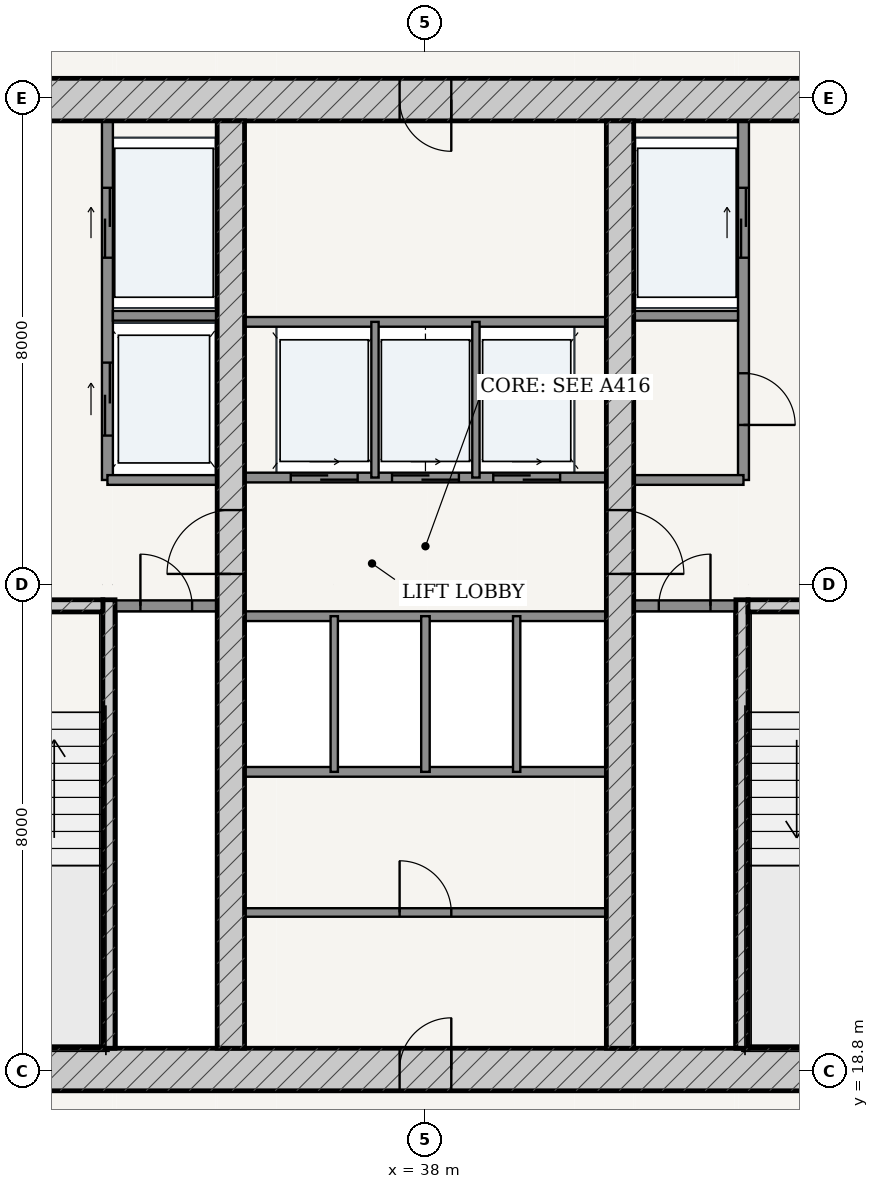
"""IFC4 building model, lengths in metres.
Left out: names, types, materials, properties, quantities, classifications, styles, units other than length and angle.
Written with IfcOpenShell. Run it as: python <this file> out.ifc"""

import sys

from ifc_helpers import new_model, si_unit, direction, frame, frame_2d, origin, place, context, subcontext, project, spatial, rectangle, extrude, source, transform, mapped, element, fill, save


model = new_model("IFC4")
c1 = context("Model", 3, precision=1e-05, world=origin(), true_north=direction((-0.2419218956, 0.970295726276)))
c2 = subcontext(c1, "Body", "Model", "MODEL_VIEW")
j1 = project(units=[si_unit("LENGTHUNIT", "METRE"), si_unit("PLANEANGLEUNIT", "RADIAN")], contexts=[c1])
p1 = place(None, origin())
s1 = spatial("IfcSite", under=j1, at=p1, CompositionType="ELEMENT")
p2 = place(p1, origin())
s2 = spatial("IfcBuilding", under=s1, at=p2, CompositionType="ELEMENT")
p3 = place(p2, frame((0.0, 0.0, 94.2)))
s3 = spatial("IfcBuildingStorey", under=s2, at=p3, CompositionType="ELEMENT", Elevation=94.2)
p4 = place(p3, frame((28.675, 18.825, 0.0), z_axis=(0.0, 0.0, 1.0), x_axis=(1.0, 0.0, 0.0)))
e1 = element("IfcWall", 1, at=p4, inside=s3, PredefinedType="SHEAR", context=c2, shape_type="SweptSolid", body=[
    extrude(rectangle(XDim=18.65, YDim=0.7, at=frame_2d((9.325, 0.0))), origin(), (0.0, 0.0, 1.0), 3.325),
])
p5 = place(p4, frame((8.9, 0.0, 0.0)))
e2 = element("IfcOpeningElement", 2, at=p5, cuts=e1, PredefinedType="OPENING", context=c2, shape_type="SweptSolid", body=[
    extrude(rectangle(XDim=0.85, YDim=2.1, at=frame_2d((0.425, 1.05))), frame((0.0, 0.36, 0.0), z_axis=(0.0, -1.0, 0.0), x_axis=(1.0, 0.0, 0.0)), (0.0, 0.0, 1.0), 0.72),
])
p6 = place(p3, frame((28.675, 34.775, 0.0), z_axis=(0.0, 0.0, 1.0), x_axis=(1.0, 0.0, 0.0)))
e3 = element("IfcWall", 3, at=p6, inside=s3, PredefinedType="SHEAR", context=c2, shape_type="SweptSolid", body=[
    extrude(rectangle(XDim=18.65, YDim=0.7, at=frame_2d((9.325, 0.0))), origin(), (0.0, 0.0, 1.0), 3.325),
])
p7 = place(p6, frame((8.9, 0.0, 0.0)))
e4 = element("IfcOpeningElement", 4, at=p7, cuts=e3, PredefinedType="OPENING", context=c2, shape_type="SweptSolid", body=[
    extrude(rectangle(XDim=0.85, YDim=2.1, at=frame_2d((0.425, 1.05))), frame((0.0, 0.36, 0.0), z_axis=(0.0, -1.0, 0.0), x_axis=(1.0, 0.0, 0.0)), (0.0, 0.0, 1.0), 0.72),
])
p8 = place(p3, frame((32.795, 19.175, 0.0), z_axis=(0.0, 0.0, 1.0), x_axis=(0.0, 1.0, 0.0)))
e5 = element("IfcWall", 5, at=p8, inside=s3, PredefinedType="SOLIDWALL", context=c2, shape_type="SweptSolid", body=[
    extrude(rectangle(XDim=7.375, YDim=0.2, at=frame_2d((3.688, 0.0))), origin(), (0.0, 0.0, 1.0), 3.325),
])
p9 = place(p3, frame((29.375, 26.45, 0.0), z_axis=(0.0, 0.0, 1.0), x_axis=(1.0, 0.0, 0.0)))
e6 = element("IfcWall", 6, at=p9, inside=s3, PredefinedType="SOLIDWALL", context=c2, shape_type="SweptSolid", body=[
    extrude(rectangle(XDim=3.32, YDim=0.2, at=frame_2d((1.66, 0.0))), origin(), (0.0, 0.0, 1.0), 3.325),
])
p10 = place(p9, frame((1.185, 0.0, 0.0)))
e7 = element("IfcOpeningElement", 7, at=p10, cuts=e6, PredefinedType="OPENING", context=c2, shape_type="SweptSolid", body=[
    extrude(rectangle(XDim=0.95, YDim=2.15, at=frame_2d((0.475, 1.075))), frame((0.0, 0.11, 0.0), z_axis=(0.0, -1.0, 0.0), x_axis=(1.0, 0.0, 0.0)), (0.0, 0.0, 1.0), 0.22),
])
p11 = place(p3, frame((43.205, 19.175, 0.0), z_axis=(0.0, 0.0, 1.0), x_axis=(0.0, 1.0, 0.0)))
e8 = element("IfcWall", 8, at=p11, inside=s3, PredefinedType="SOLIDWALL", context=c2, shape_type="SweptSolid", body=[
    extrude(rectangle(XDim=7.375, YDim=0.2, at=frame_2d((3.688, 0.0))), origin(), (0.0, 0.0, 1.0), 3.325),
])
p12 = place(p3, frame((43.305, 26.45, 0.0), z_axis=(0.0, 0.0, 1.0), x_axis=(1.0, 0.0, 0.0)))
e9 = element("IfcWall", 9, at=p12, inside=s3, PredefinedType="SOLIDWALL", context=c2, shape_type="SweptSolid", body=[
    extrude(rectangle(XDim=3.32, YDim=0.2, at=frame_2d((1.66, 0.0))), origin(), (0.0, 0.0, 1.0), 3.325),
])
p13 = place(p12, frame((1.185, 0.0, 0.0)))
e10 = element("IfcOpeningElement", 10, at=p13, cuts=e9, PredefinedType="OPENING", context=c2, shape_type="SweptSolid", body=[
    extrude(rectangle(XDim=0.95, YDim=2.15, at=frame_2d((0.475, 1.075))), frame((0.0, 0.11, 0.0), z_axis=(0.0, -1.0, 0.0), x_axis=(1.0, 0.0, 0.0)), (0.0, 0.0, 1.0), 0.22),
])
p14 = place(p3, frame((34.8, 19.175, 0.0), z_axis=(0.0, 0.0, 1.0), x_axis=(0.0, 1.0, 0.0)))
e11 = element("IfcWall", 11, at=p14, inside=s3, PredefinedType="SHEAR", context=c2, shape_type="SweptSolid", body=[
    extrude(rectangle(XDim=15.25, YDim=0.45, at=frame_2d((7.625, 0.0))), origin(), (0.0, 0.0, 1.0), 3.325),
])
p15 = place(p14, frame((7.8, 0.0, 0.0)))
e12 = element("IfcOpeningElement", 12, at=p15, cuts=e11, PredefinedType="OPENING", context=c2, shape_type="SweptSolid", body=[
    extrude(rectangle(XDim=1.05, YDim=2.15, at=frame_2d((0.525, 1.075))), frame((0.0, 0.235, 0.0), z_axis=(0.0, -1.0, 0.0), x_axis=(1.0, 0.0, 0.0)), (0.0, 0.0, 1.0), 0.47),
])
p16 = place(p3, frame((41.2, 19.175, 0.0), z_axis=(0.0, 0.0, 1.0), x_axis=(0.0, 1.0, 0.0)))
e13 = element("IfcWall", 13, at=p16, inside=s3, PredefinedType="SHEAR", context=c2, shape_type="SweptSolid", body=[
    extrude(rectangle(XDim=15.25, YDim=0.45, at=frame_2d((7.625, 0.0))), origin(), (0.0, 0.0, 1.0), 3.325),
])
p17 = place(p16, frame((7.8, 0.0, 0.0)))
e14 = element("IfcOpeningElement", 14, at=p17, cuts=e13, PredefinedType="OPENING", context=c2, shape_type="SweptSolid", body=[
    extrude(rectangle(XDim=1.05, YDim=2.15, at=frame_2d((0.525, 1.075))), frame((0.0, 0.235, 0.0), z_axis=(0.0, -1.0, 0.0), x_axis=(1.0, 0.0, 0.0)), (0.0, 0.0, 1.0), 0.47),
])
p18 = place(p3, frame((32.9, 26.45, 0.0), z_axis=(0.0, 0.0, 1.0), x_axis=(1.0, 0.0, 0.0)))
e15 = element("IfcWall", 15, at=p18, inside=s3, PredefinedType="PARTITIONING", context=c2, shape_type="SweptSolid", body=[
    extrude(rectangle(XDim=1.675, YDim=0.18, at=frame_2d((0.837, 0.0))), origin(), (0.0, 0.0, 1.0), 3.325),
])
p19 = place(p18, frame((0.413, 0.0, 0.0)))
e16 = element("IfcOpeningElement", 16, at=p19, cuts=e15, PredefinedType="OPENING", context=c2, shape_type="SweptSolid", body=[
    extrude(rectangle(XDim=0.85, YDim=2.1, at=frame_2d((0.425, 1.05))), frame((0.0, 0.1, 0.0), z_axis=(0.0, -1.0, 0.0), x_axis=(1.0, 0.0, 0.0)), (0.0, 0.0, 1.0), 0.2),
])
p20 = place(p3, frame((41.425, 26.45, 0.0), z_axis=(0.0, 0.0, 1.0), x_axis=(1.0, 0.0, 0.0)))
e17 = element("IfcWall", 17, at=p20, inside=s3, PredefinedType="PARTITIONING", context=c2, shape_type="SweptSolid", body=[
    extrude(rectangle(XDim=1.675, YDim=0.18, at=frame_2d((0.837, 0.0))), origin(), (0.0, 0.0, 1.0), 3.325),
])
p21 = place(p20, frame((0.413, 0.0, 0.0)))
e18 = element("IfcOpeningElement", 18, at=p21, cuts=e17, PredefinedType="OPENING", context=c2, shape_type="SweptSolid", body=[
    extrude(rectangle(XDim=0.85, YDim=2.1, at=frame_2d((0.425, 1.05))), frame((0.0, 0.1, 0.0), z_axis=(0.0, -1.0, 0.0), x_axis=(1.0, 0.0, 0.0)), (0.0, 0.0, 1.0), 0.2),
])
p22 = place(p3, frame((32.77, 28.52, 0.0), z_axis=(0.0, 0.0, 1.0), x_axis=(0.0, 1.0, 0.0)))
e19 = element("IfcWall", 19, at=p22, inside=s3, PredefinedType="PARTITIONING", context=c2, shape_type="SweptSolid", body=[
    extrude(rectangle(XDim=5.905, YDim=0.18, at=frame_2d((2.953, 0.0))), origin(), (0.0, 0.0, 1.0), 3.325),
])
p23 = place(p22, frame((3.655, 0.0, 0.0)))
e20 = element("IfcOpeningElement", 20, at=p23, cuts=e19, PredefinedType="OPENING", context=c2, shape_type="SweptSolid", body=[
    extrude(rectangle(XDim=1.15, YDim=2.2, at=frame_2d((0.575, 1.1))), frame((0.0, 0.1, 0.0), z_axis=(0.0, -1.0, 0.0), x_axis=(1.0, 0.0, 0.0)), (0.0, 0.0, 1.0), 0.2),
])
p24 = place(p22, frame((0.73, 0.0, 0.0)))
e21 = element("IfcOpeningElement", 21, at=p24, cuts=e19, PredefinedType="OPENING", context=c2, shape_type="SweptSolid", body=[
    extrude(rectangle(XDim=1.2, YDim=2.25, at=frame_2d((0.6, 1.125))), frame((0.0, 0.1, 0.0), z_axis=(0.0, -1.0, 0.0), x_axis=(1.0, 0.0, 0.0)), (0.0, 0.0, 1.0), 0.2),
])
p25 = place(p3, frame((32.86, 31.22, 0.0), z_axis=(0.0, 0.0, 1.0), x_axis=(1.0, 0.0, 0.0)))
e22 = element("IfcWall", 22, at=p25, inside=s3, PredefinedType="PARTITIONING", context=c2, shape_type="SweptSolid", body=[
    extrude(rectangle(XDim=1.715, YDim=0.16, at=frame_2d((0.857, 0.0))), origin(), (0.0, 0.0, 1.0), 3.325),
])
p26 = place(p3, frame((32.77, 28.52, 0.0), z_axis=(0.0, 0.0, 1.0), x_axis=(1.0, 0.0, 0.0)))
e23 = element("IfcWall", 23, at=p26, inside=s3, PredefinedType="PARTITIONING", context=c2, shape_type="SweptSolid", body=[
    extrude(rectangle(XDim=1.805, YDim=0.16, at=frame_2d((0.902, 0.0))), origin(), (0.0, 0.0, 1.0), 3.325),
])
p27 = place(p3, frame((43.23, 28.52, 0.0), z_axis=(0.0, 0.0, 1.0), x_axis=(0.0, 1.0, 0.0)))
e24 = element("IfcWall", 24, at=p27, inside=s3, PredefinedType="PARTITIONING", context=c2, shape_type="SweptSolid", body=[
    extrude(rectangle(XDim=5.905, YDim=0.18, at=frame_2d((2.953, 0.0))), origin(), (0.0, 0.0, 1.0), 3.325),
])
p28 = place(p27, frame((0.905, 0.0, 0.0)))
e25 = element("IfcOpeningElement", 25, at=p28, cuts=e24, PredefinedType="OPENING", context=c2, shape_type="SweptSolid", body=[
    extrude(rectangle(XDim=0.85, YDim=2.1, at=frame_2d((0.425, 1.05))), frame((0.0, 0.1, 0.0), z_axis=(0.0, -1.0, 0.0), x_axis=(1.0, 0.0, 0.0)), (0.0, 0.0, 1.0), 0.2),
])
p29 = place(p27, frame((3.655, 0.0, 0.0)))
e26 = element("IfcOpeningElement", 26, at=p29, cuts=e24, PredefinedType="OPENING", context=c2, shape_type="SweptSolid", body=[
    extrude(rectangle(XDim=1.15, YDim=2.2, at=frame_2d((0.575, 1.1))), frame((0.0, 0.1, 0.0), z_axis=(0.0, -1.0, 0.0), x_axis=(1.0, 0.0, 0.0)), (0.0, 0.0, 1.0), 0.2),
])
p30 = place(p3, frame((41.425, 31.22, 0.0), z_axis=(0.0, 0.0, 1.0), x_axis=(1.0, 0.0, 0.0)))
e27 = element("IfcWall", 27, at=p30, inside=s3, PredefinedType="PARTITIONING", context=c2, shape_type="SweptSolid", body=[
    extrude(rectangle(XDim=1.715, YDim=0.16, at=frame_2d((0.857, 0.0))), origin(), (0.0, 0.0, 1.0), 3.325),
])
p31 = place(p3, frame((41.425, 28.52, 0.0), z_axis=(0.0, 0.0, 1.0), x_axis=(1.0, 0.0, 0.0)))
e28 = element("IfcWall", 28, at=p31, inside=s3, PredefinedType="PARTITIONING", context=c2, shape_type="SweptSolid", body=[
    extrude(rectangle(XDim=1.805, YDim=0.16, at=frame_2d((0.902, 0.0))), origin(), (0.0, 0.0, 1.0), 3.325),
])
p32 = place(p3, frame((35.025, 28.56, 0.0), z_axis=(0.0, 0.0, 1.0), x_axis=(1.0, 0.0, 0.0)))
e29 = element("IfcWall", 29, at=p32, inside=s3, PredefinedType="PARTITIONING", context=c2, shape_type="SweptSolid", body=[
    extrude(rectangle(XDim=5.95, YDim=0.16, at=frame_2d((2.975, 0.0))), origin(), (0.0, 0.0, 1.0), 3.325),
])
p33 = place(p32, frame((0.76, 0.0, 0.0)))
e30 = element("IfcOpeningElement", 30, at=p33, cuts=e29, PredefinedType="OPENING", context=c2, shape_type="SweptSolid", body=[
    extrude(rectangle(XDim=1.1, YDim=2.2, at=frame_2d((0.55, 1.1))), frame((0.0, 0.09, 0.0), z_axis=(0.0, -1.0, 0.0), x_axis=(1.0, 0.0, 0.0)), (0.0, 0.0, 1.0), 0.18),
])
p34 = place(p32, frame((2.425, 0.0, 0.0)))
e31 = element("IfcOpeningElement", 31, at=p34, cuts=e29, PredefinedType="OPENING", context=c2, shape_type="SweptSolid", body=[
    extrude(rectangle(XDim=1.1, YDim=2.2, at=frame_2d((0.55, 1.1))), frame((0.0, 0.09, 0.0), z_axis=(0.0, -1.0, 0.0), x_axis=(1.0, 0.0, 0.0)), (0.0, 0.0, 1.0), 0.18),
])
p35 = place(p32, frame((4.09, 0.0, 0.0)))
e32 = element("IfcOpeningElement", 32, at=p35, cuts=e29, PredefinedType="OPENING", context=c2, shape_type="SweptSolid", body=[
    extrude(rectangle(XDim=1.1, YDim=2.2, at=frame_2d((0.55, 1.1))), frame((0.0, 0.09, 0.0), z_axis=(0.0, -1.0, 0.0), x_axis=(1.0, 0.0, 0.0)), (0.0, 0.0, 1.0), 0.18),
])
p36 = place(p3, frame((35.025, 31.12, 0.0), z_axis=(0.0, 0.0, 1.0), x_axis=(1.0, 0.0, 0.0)))
e33 = element("IfcWall", 33, at=p36, inside=s3, PredefinedType="PARTITIONING", context=c2, shape_type="SweptSolid", body=[
    extrude(rectangle(XDim=5.95, YDim=0.16, at=frame_2d((2.975, 0.0))), origin(), (0.0, 0.0, 1.0), 3.325),
])
for number, where, z_axis, x_axis in (
    (34, (37.17, 28.56, 0.0), (0.0, 0.0, 1.0), (0.0, 1.0, 0.0)),
    (35, (38.83, 28.56, 0.0), (0.0, 0.0, 1.0), (0.0, 1.0, 0.0)),
):
    element("IfcWall", number, at=place(p3, frame(where, z_axis=z_axis, x_axis=x_axis)), inside=s3, PredefinedType="PARTITIONING", context=c2, shape_type="SweptSolid", body=[
        extrude(rectangle(XDim=2.56, YDim=0.12, at=frame_2d((1.28, 0.0))), origin(), (0.0, 0.0, 1.0), 3.325),
    ])
for number, where, z_axis, x_axis in (
    (36, (35.025, 26.28, 0.0), (0.0, 0.0, 1.0), (1.0, 0.0, 0.0)),
    (37, (35.025, 23.72, 0.0), (0.0, 0.0, 1.0), (1.0, 0.0, 0.0)),
):
    element("IfcWall", number, at=place(p3, frame(where, z_axis=z_axis, x_axis=x_axis)), inside=s3, PredefinedType="PARTITIONING", context=c2, shape_type="SweptSolid", body=[
        extrude(rectangle(XDim=5.95, YDim=0.16, at=frame_2d((2.975, 0.0))), origin(), (0.0, 0.0, 1.0), 3.325),
    ])
p37 = place(p3, frame((36.5, 23.72, 0.0), z_axis=(0.0, 0.0, 1.0), x_axis=(0.0, 1.0, 0.0)))
e38 = element("IfcWall", 38, at=p37, inside=s3, PredefinedType="PARTITIONING", context=c2, shape_type="SweptSolid", body=[
    extrude(rectangle(XDim=2.56, YDim=0.12, at=frame_2d((1.28, 0.0))), origin(), (0.0, 0.0, 1.0), 3.325),
])
p38 = place(p3, frame((38.0, 23.72, 0.0), z_axis=(0.0, 0.0, 1.0), x_axis=(0.0, 1.0, 0.0)))
e39 = element("IfcWall", 39, at=p38, inside=s3, PredefinedType="PARTITIONING", context=c2, shape_type="SweptSolid", body=[
    extrude(rectangle(XDim=2.56, YDim=0.14, at=frame_2d((1.28, 0.0))), origin(), (0.0, 0.0, 1.0), 3.325),
])
p39 = place(p3, frame((39.5, 23.72, 0.0), z_axis=(0.0, 0.0, 1.0), x_axis=(0.0, 1.0, 0.0)))
e40 = element("IfcWall", 40, at=p39, inside=s3, PredefinedType="PARTITIONING", context=c2, shape_type="SweptSolid", body=[
    extrude(rectangle(XDim=2.56, YDim=0.12, at=frame_2d((1.28, 0.0))), origin(), (0.0, 0.0, 1.0), 3.325),
])
p40 = place(p3, frame((35.025, 21.407, 0.0), z_axis=(0.0, 0.0, 1.0), x_axis=(1.0, 0.0, 0.0)))
e41 = element("IfcWall", 41, at=p40, inside=s3, PredefinedType="PARTITIONING", context=c2, shape_type="SweptSolid", body=[
    extrude(rectangle(XDim=5.95, YDim=0.14, at=frame_2d((2.975, 0.0))), origin(), (0.0, 0.0, 1.0), 3.325),
])
p41 = place(p40, frame((2.55, 0.0, 0.0)))
e42 = element("IfcOpeningElement", 42, at=p41, cuts=e41, PredefinedType="OPENING", context=c2, shape_type="SweptSolid", body=[
    extrude(rectangle(XDim=0.85, YDim=2.1, at=frame_2d((0.425, 1.05))), frame((0.0, 0.08, 0.0), z_axis=(0.0, -1.0, 0.0), x_axis=(1.0, 0.0, 0.0)), (0.0, 0.0, 1.0), 0.16),
])
m1 = source(origin(), c2, "Body", "SweptSolid", [
    extrude(rectangle(XDim=1.05, YDim=2.15, at=frame_2d((0.525, 1.075))), frame((0.0, 0.025, 0.0), z_axis=(0.0, -1.0, 0.0), x_axis=(1.0, 0.0, 0.0)), (0.0, 0.0, 1.0), 0.05),
])
p42 = place(p15, origin())
e43 = element("IfcDoor", 43, at=p42, inside=s3, OperationType="SINGLE_SWING_LEFT", PredefinedType="DOOR", context=c2, shape_type="MappedRepresentation", body=[
    mapped(m1, transform((0.0, 0.0, 0.0), scale=1.0)),
])
fill(e12, e43)
p43 = place(p17, frame((1.05, 0.0, 0.0), z_axis=(0.0, 0.0, 1.0), x_axis=(-1.0, 0.0, 0.0)))
e44 = element("IfcDoor", 44, at=p43, inside=s3, OperationType="SINGLE_SWING_RIGHT", PredefinedType="DOOR", context=c2, shape_type="MappedRepresentation", body=[
    mapped(m1, transform((0.0, 0.0, 0.0), scale=1.0)),
])
fill(e14, e44)
m2 = source(origin(), c2, "Body", "SweptSolid", [
    extrude(rectangle(XDim=0.85, YDim=2.1, at=frame_2d((0.425, 1.05))), frame((0.0, 0.025, 0.0), z_axis=(0.0, -1.0, 0.0), x_axis=(1.0, 0.0, 0.0)), (0.0, 0.0, 1.0), 0.05),
])
p44 = place(p19, origin())
e45 = element("IfcDoor", 45, at=p44, inside=s3, OperationType="SINGLE_SWING_LEFT", PredefinedType="DOOR", context=c2, shape_type="MappedRepresentation", body=[
    mapped(m2, transform((0.0, 0.0, 0.0), scale=1.0)),
])
fill(e16, e45)
p45 = place(p21, origin())
e46 = element("IfcDoor", 46, at=p45, inside=s3, OperationType="SINGLE_SWING_RIGHT", PredefinedType="DOOR", context=c2, shape_type="MappedRepresentation", body=[
    mapped(m2, transform((0.0, 0.0, 0.0), scale=1.0)),
])
fill(e18, e46)
p46 = place(p28, frame((0.85, 0.0, 0.0), z_axis=(0.0, 0.0, 1.0), x_axis=(-1.0, 0.0, 0.0)))
e47 = element("IfcDoor", 47, at=p46, inside=s3, OperationType="SINGLE_SWING_RIGHT", PredefinedType="DOOR", context=c2, shape_type="MappedRepresentation", body=[
    mapped(m2, transform((0.0, 0.0, 0.0), scale=1.0)),
])
fill(e25, e47)
p47 = place(p7, frame((0.85, 0.0, 0.0), z_axis=(0.0, 0.0, 1.0), x_axis=(-1.0, 0.0, 0.0)))
e48 = element("IfcDoor", 48, at=p47, inside=s3, OperationType="SINGLE_SWING_LEFT", PredefinedType="DOOR", context=c2, shape_type="MappedRepresentation", body=[
    mapped(m2, transform((0.0, 0.0, 0.0), scale=1.0)),
])
fill(e4, e48)
p48 = place(p5, origin())
e49 = element("IfcDoor", 49, at=p48, inside=s3, OperationType="SINGLE_SWING_RIGHT", PredefinedType="DOOR", context=c2, shape_type="MappedRepresentation", body=[
    mapped(m2, transform((0.0, 0.0, 0.0), scale=1.0)),
])
fill(e2, e49)
p49 = place(p41, origin())
e50 = element("IfcDoor", 50, at=p49, inside=s3, OperationType="SINGLE_SWING_LEFT", PredefinedType="DOOR", context=c2, shape_type="MappedRepresentation", body=[
    mapped(m2, transform((0.0, 0.0, 0.0), scale=1.0)),
])
fill(e42, e50)
m3 = source(origin(), c2, "Body", "SweptSolid", [
    extrude(rectangle(XDim=1.15, YDim=2.2, at=frame_2d((0.575, 1.1))), frame((0.0, 0.025, 0.0), z_axis=(0.0, -1.0, 0.0), x_axis=(1.0, 0.0, 0.0)), (0.0, 0.0, 1.0), 0.05),
])
p50 = place(p23, origin())
e51 = element("IfcDoor", 51, at=p50, inside=s3, OperationType="DOUBLE_DOOR_SLIDING", PredefinedType="DOOR", context=c2, shape_type="MappedRepresentation", body=[
    mapped(m3, transform((0.0, 0.0, 0.0), scale=1.0)),
])
fill(e20, e51)
p51 = place(p29, origin())
e52 = element("IfcDoor", 52, at=p51, inside=s3, OperationType="DOUBLE_DOOR_SLIDING", PredefinedType="DOOR", context=c2, shape_type="MappedRepresentation", body=[
    mapped(m3, transform((0.0, 0.0, 0.0), scale=1.0)),
])
fill(e26, e52)
m4 = source(origin(), c2, "Body", "SweptSolid", [
    extrude(rectangle(XDim=1.2, YDim=2.25, at=frame_2d((0.6, 1.125))), frame((0.0, 0.025, 0.0), z_axis=(0.0, -1.0, 0.0), x_axis=(1.0, 0.0, 0.0)), (0.0, 0.0, 1.0), 0.05),
])
p52 = place(p24, origin())
e53 = element("IfcDoor", 53, at=p52, inside=s3, OperationType="DOUBLE_DOOR_SLIDING", PredefinedType="DOOR", context=c2, shape_type="MappedRepresentation", body=[
    mapped(m4, transform((0.0, 0.0, 0.0), scale=1.0)),
])
fill(e21, e53)
m5 = source(origin(), c2, "Body", "SweptSolid", [
    extrude(rectangle(XDim=1.1, YDim=2.2, at=frame_2d((0.55, 1.1))), frame((0.0, 0.025, 0.0), z_axis=(0.0, -1.0, 0.0), x_axis=(1.0, 0.0, 0.0)), (0.0, 0.0, 1.0), 0.05),
])
p53 = place(p33, origin())
e54 = element("IfcDoor", 54, at=p53, inside=s3, OperationType="DOUBLE_DOOR_SLIDING", PredefinedType="DOOR", context=c2, shape_type="MappedRepresentation", body=[
    mapped(m5, transform((0.0, 0.0, 0.0), scale=1.0)),
])
fill(e30, e54)
p54 = place(p34, origin())
e55 = element("IfcDoor", 55, at=p54, inside=s3, OperationType="DOUBLE_DOOR_SLIDING", PredefinedType="DOOR", context=c2, shape_type="MappedRepresentation", body=[
    mapped(m5, transform((0.0, 0.0, 0.0), scale=1.0)),
])
fill(e31, e55)
p55 = place(p35, origin())
e56 = element("IfcDoor", 56, at=p55, inside=s3, OperationType="DOUBLE_DOOR_SLIDING", PredefinedType="DOOR", context=c2, shape_type="MappedRepresentation", body=[
    mapped(m5, transform((0.0, 0.0, 0.0), scale=1.0)),
])
fill(e32, e56)
save(model, sys.argv[1])
